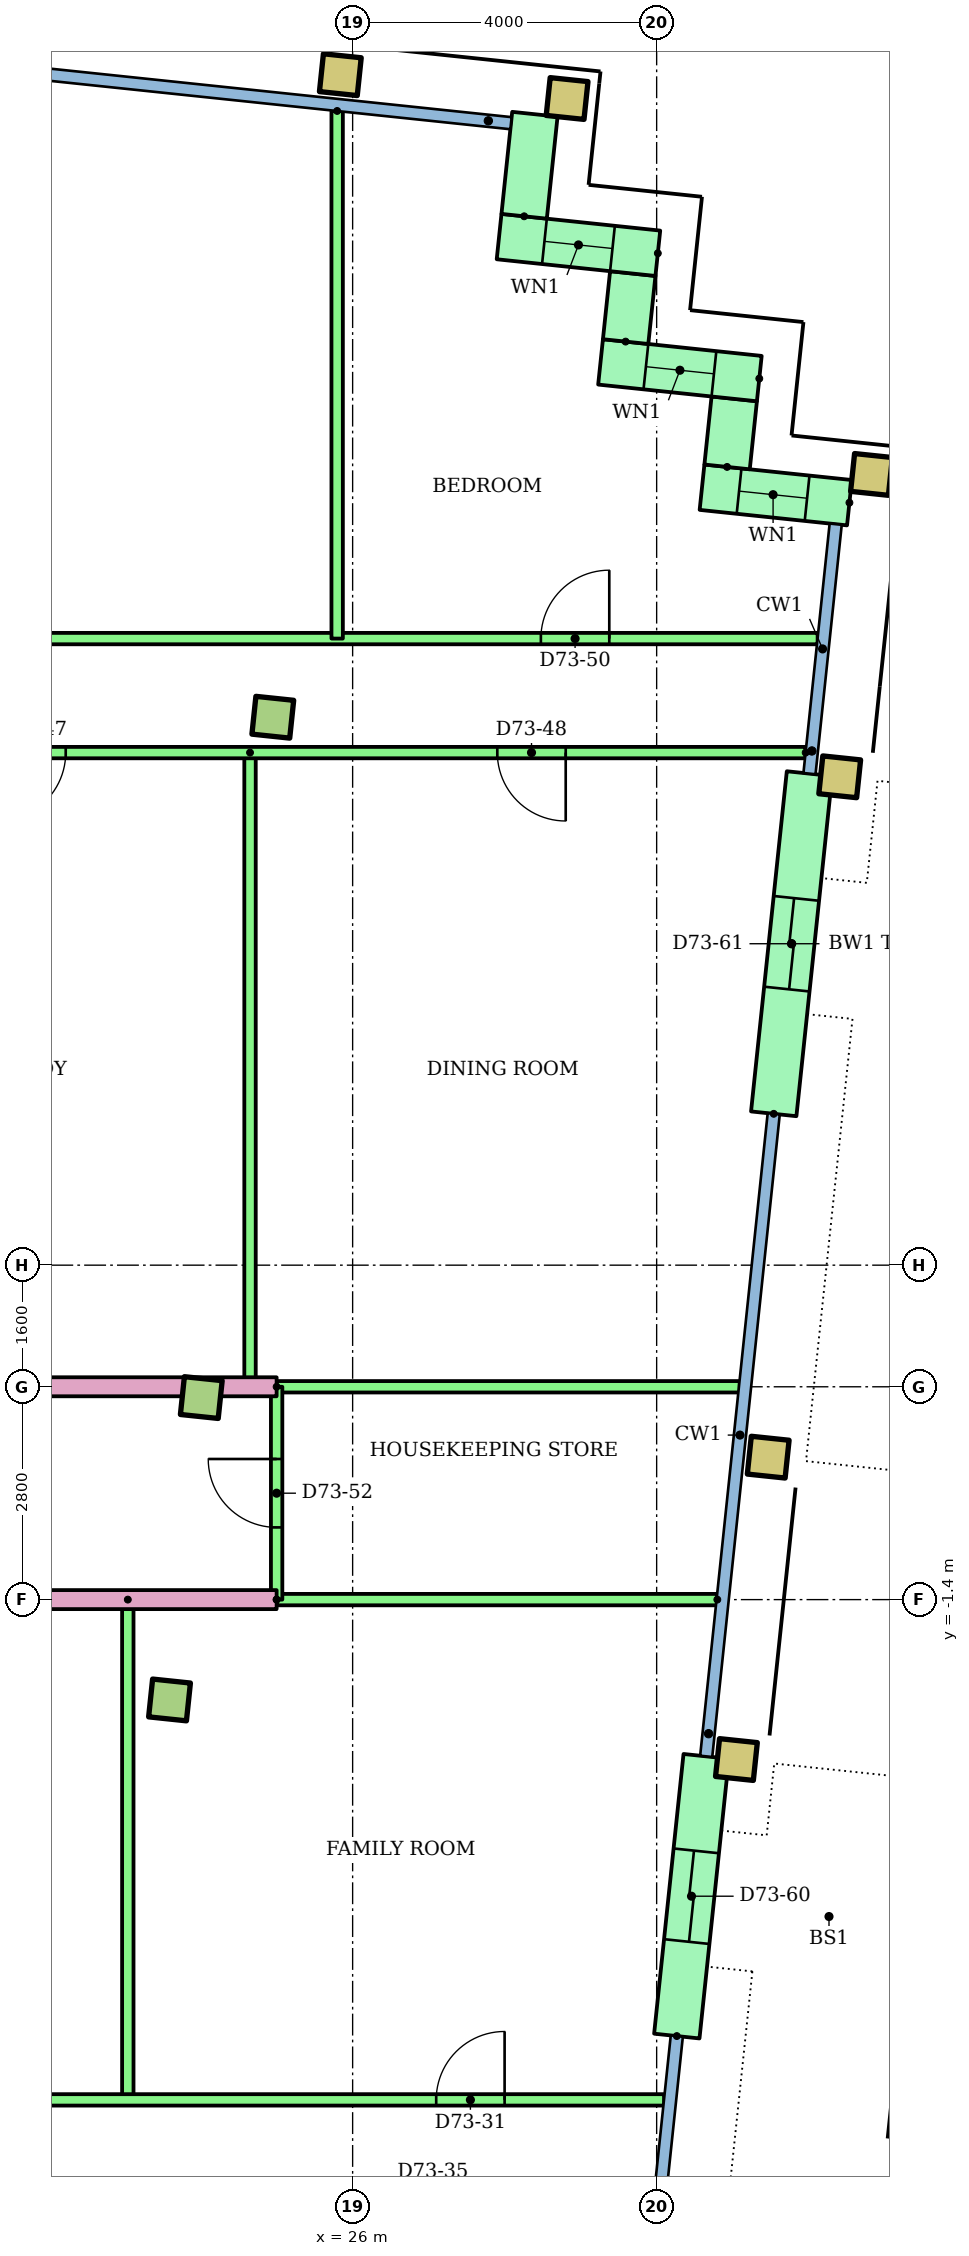
"""IFC4 building model, lengths in metres.
Left out: names, types, materials, properties, quantities, classifications, styles, units other than length and angle.
Written with IfcOpenShell. Run it as: python <this file> out.ifc"""

import sys

from ifc_helpers import new_model, si_unit, direction, frame, frame_2d, origin, origin_2d, place, context, subcontext, project, spatial, rectangle, hollow_rectangle, extrude, element, fill, save


model = new_model("IFC4")
c1 = context("Model", 3, precision=1e-05, world=origin(), true_north=direction((0.0, 1.0)))
c2 = subcontext(c1, "Body", "Model", "MODEL_VIEW")
j1 = project(units=[si_unit("LENGTHUNIT", "METRE"), si_unit("PLANEANGLEUNIT", "RADIAN")], contexts=[c1])
p1 = place(None, origin())
s1 = spatial("IfcSite", under=j1, at=p1, CompositionType="ELEMENT")
p2 = place(p1, origin())
s2 = spatial("IfcBuilding", under=s1, at=p2, CompositionType="ELEMENT")
p3 = place(p2, frame((0.0, 0.0, 278.7)))
s3 = spatial("IfcBuildingStorey", under=s2, at=p3, CompositionType="ELEMENT", Elevation=278.7)
p4 = place(p3, frame((23.591, -2.72, 0.0), z_axis=(0.0, 0.0, 1.0), x_axis=(0.994521895368, -0.104528463268, 0.0)))
e1 = element("IfcColumn", 1, at=p4, inside=s3, PredefinedType="COLUMN", context=c2, shape_type="SweptSolid", body=[
    extrude(rectangle(XDim=0.5, YDim=0.5, at=origin_2d()), origin(), (0.0, 0.0, 1.0), 3.2),
])
p5 = place(p3, frame((31.05, -3.504, 0.0), z_axis=(0.0, 0.0, 1.0), x_axis=(0.994521895368, -0.104528463268, 0.0)))
e2 = element("IfcColumn", 2, at=p5, inside=s3, PredefinedType="COLUMN", context=c2, shape_type="SweptSolid", body=[
    extrude(hollow_rectangle(XDim=0.5, YDim=0.5, WallThickness=0.025, at=origin_2d()), origin(), (0.0, 0.0, 1.0), 3.2),
])
p6 = place(p3, frame((24.009, 1.258, 0.0), z_axis=(0.0, 0.0, 1.0), x_axis=(0.994521895368, -0.104528463268, 0.0)))
e3 = element("IfcColumn", 3, at=p6, inside=s3, PredefinedType="COLUMN", context=c2, shape_type="SweptSolid", body=[
    extrude(rectangle(XDim=0.5, YDim=0.5, at=origin_2d()), origin(), (0.0, 0.0, 1.0), 3.2),
])
p7 = place(p3, frame((31.468, 0.474, 0.0), z_axis=(0.0, 0.0, 1.0), x_axis=(0.994521895368, -0.104528463268, 0.0)))
e4 = element("IfcColumn", 4, at=p7, inside=s3, PredefinedType="COLUMN", context=c2, shape_type="SweptSolid", body=[
    extrude(hollow_rectangle(XDim=0.5, YDim=0.5, WallThickness=0.025, at=origin_2d()), origin(), (0.0, 0.0, 1.0), 3.2),
])
p8 = place(p3, frame((24.95, 10.209, 0.0), z_axis=(0.0, 0.0, 1.0), x_axis=(0.994521895368, -0.104528463268, 0.0)))
e5 = element("IfcColumn", 5, at=p8, inside=s3, PredefinedType="COLUMN", context=c2, shape_type="SweptSolid", body=[
    extrude(rectangle(XDim=0.5, YDim=0.5, at=origin_2d()), origin(), (0.0, 0.0, 1.0), 3.2),
])
for number, where, z_axis, x_axis in (
    (6, (32.409, 9.425, 0.0), (0.0, 0.0, 1.0), (0.995, -0.105, 0.0)),
    (7, (32.827, 13.403, 0.0), (0.0, 0.0, 1.0), (0.995, -0.105, 0.0)),
    (8, (25.838, 18.662, 0.0), (0.0, 0.0, 1.0), (0.995, -0.105, 0.0)),
    (9, (28.822, 18.349, 0.0), (0.0, 0.0, 1.0), (0.995, -0.105, 0.0)),
):
    element("IfcColumn", number, at=place(p3, frame(where, z_axis=z_axis, x_axis=x_axis)), inside=s3, PredefinedType="COLUMN", context=c2, shape_type="SweptSolid", body=[
        extrude(hollow_rectangle(XDim=0.5, YDim=0.5, WallThickness=0.025, at=origin_2d()), origin(), (0.0, 0.0, 1.0), 3.2),
    ])
p9 = place(p3, frame((32.536, 13.031, 0.0), z_axis=(0.0, 0.0, 1.0), x_axis=(-0.994534226826, 0.104411070641, 0.0)))
e10 = element("IfcWall", 10, at=p9, inside=s3, PredefinedType="STANDARD", context=c2, shape_type="SweptSolid", body=[
    extrude(rectangle(XDim=1.95, YDim=0.6, at=frame_2d((0.975, 0.0))), origin(), (0.0, 0.0, 1.0), 2.8),
])
p10 = place(p9, frame((0.56, 0.0, 0.9)))
e11 = element("IfcOpeningElement", 11, at=p10, cuts=e10, PredefinedType="OPENING", context=c2, shape_type="SweptSolid", body=[
    extrude(rectangle(XDim=0.9, YDim=1.5, at=frame_2d((0.45, 0.75))), frame((0.0, 0.31, 0.0), z_axis=(0.0, -1.0, 0.0), x_axis=(1.0, 0.0, 0.0)), (0.0, 0.0, 1.0), 0.62),
])
p11 = place(p3, frame((30.927, 13.502, 0.0), z_axis=(0.0, 0.0, 1.0), x_axis=(0.104416541099, 0.994533652495, 0.0)))
e12 = element("IfcWall", 12, at=p11, inside=s3, PredefinedType="STANDARD", context=c2, shape_type="SweptSolid", body=[
    extrude(rectangle(XDim=0.9, YDim=0.6, at=frame_2d((0.45, 0.0))), origin(), (0.0, 0.0, 1.0), 2.8),
])
p12 = place(p3, frame((31.351, 14.664, 0.0), z_axis=(0.0, 0.0, 1.0), x_axis=(-0.994523910136, 0.104509292252, 0.0)))
e13 = element("IfcWall", 13, at=p12, inside=s3, PredefinedType="STANDARD", context=c2, shape_type="SweptSolid", body=[
    extrude(rectangle(XDim=2.1, YDim=0.6, at=frame_2d((1.05, 0.0))), origin(), (0.0, 0.0, 1.0), 2.8),
])
p13 = place(p12, frame((0.6, 0.0, 0.9)))
e14 = element("IfcOpeningElement", 14, at=p13, cuts=e13, PredefinedType="OPENING", context=c2, shape_type="SweptSolid", body=[
    extrude(rectangle(XDim=0.9, YDim=1.5, at=frame_2d((0.45, 0.75))), frame((0.0, 0.31, 0.0), z_axis=(0.0, -1.0, 0.0), x_axis=(1.0, 0.0, 0.0)), (0.0, 0.0, 1.0), 0.62),
])
p14 = place(p3, frame((29.592, 15.151, 0.0), z_axis=(0.0, 0.0, 1.0), x_axis=(0.104444712852, 0.994530694326, 0.0)))
e15 = element("IfcWall", 15, at=p14, inside=s3, PredefinedType="STANDARD", context=c2, shape_type="SweptSolid", body=[
    extrude(rectangle(XDim=0.9, YDim=0.6, at=frame_2d((0.45, 0.0))), origin(), (0.0, 0.0, 1.0), 2.8),
])
p15 = place(p3, frame((30.015, 16.312, 0.0), z_axis=(0.0, 0.0, 1.0), x_axis=(-0.994510548187, 0.104636368175, 0.0)))
e16 = element("IfcWall", 16, at=p15, inside=s3, PredefinedType="STANDARD", context=c2, shape_type="SweptSolid", body=[
    extrude(rectangle(XDim=2.1, YDim=0.6, at=frame_2d((1.05, 0.0))), origin(), (0.0, 0.0, 1.0), 2.8),
])
p16 = place(p15, frame((0.6, 0.0, 0.9)))
e17 = element("IfcOpeningElement", 17, at=p16, cuts=e16, PredefinedType="OPENING", context=c2, shape_type="SweptSolid", body=[
    extrude(rectangle(XDim=0.9, YDim=1.5, at=frame_2d((0.45, 0.75))), frame((0.0, 0.31, 0.0), z_axis=(0.0, -1.0, 0.0), x_axis=(1.0, 0.0, 0.0)), (0.0, 0.0, 1.0), 0.62),
])
p17 = place(p3, frame((28.257, 16.799, 0.0), z_axis=(0.0, 0.0, 1.0), x_axis=(0.104534153452, 0.994521297289, 0.0)))
e18 = element("IfcWall", 18, at=p17, inside=s3, PredefinedType="STANDARD", context=c2, shape_type="SweptSolid", body=[
    extrude(rectangle(XDim=1.35, YDim=0.6, at=frame_2d((0.675, 0.0))), origin(), (0.0, 0.0, 1.0), 2.8),
])
p18 = place(p3, frame((30.265, -7.142, 0.0), z_axis=(0.0, 0.0, 1.0), x_axis=(0.104513052986, 0.994523514933, 0.0)))
e19 = element("IfcWall", 19, at=p18, inside=s3, PredefinedType="STANDARD", context=c2, shape_type="SweptSolid", body=[
    extrude(rectangle(XDim=3.7, YDim=0.6, at=frame_2d((1.85, 0.0))), origin(), (0.0, 0.0, 1.0), 2.8),
])
p19 = place(p18, frame((1.25, 0.0, 0.0)))
e20 = element("IfcOpeningElement", 20, at=p19, cuts=e19, PredefinedType="OPENING", context=c2, shape_type="SweptSolid", body=[
    extrude(rectangle(XDim=1.2, YDim=2.1, at=frame_2d((0.6, 1.05))), frame((0.0, 0.31, 0.0), z_axis=(0.0, -1.0, 0.0), x_axis=(1.0, 0.0, 0.0)), (0.0, 0.0, 1.0), 0.62),
])
p20 = place(p3, frame((31.54, 4.991, 0.0), z_axis=(0.0, 0.0, 1.0), x_axis=(0.104546400045, 0.994520009974, 0.0)))
e21 = element("IfcWall", 21, at=p20, inside=s3, PredefinedType="STANDARD", context=c2, shape_type="SweptSolid", body=[
    extrude(rectangle(XDim=4.5, YDim=0.6, at=frame_2d((2.25, 0.0))), origin(), (0.0, 0.0, 1.0), 2.8),
])
p21 = place(p20, frame((1.65, 0.0, 0.0)))
e22 = element("IfcOpeningElement", 22, at=p21, cuts=e21, PredefinedType="OPENING", context=c2, shape_type="SweptSolid", body=[
    extrude(rectangle(XDim=1.2, YDim=2.1, at=frame_2d((0.6, 1.05))), frame((0.0, 0.31, 0.0), z_axis=(0.0, -1.0, 0.0), x_axis=(1.0, 0.0, 0.0)), (0.0, 0.0, 1.0), 0.62),
])
p22 = place(p3, frame((23.042, -1.4, 0.0), z_axis=(0.0, 0.0, 1.0), x_axis=(0.0, -1.0, 0.0)))
e23 = element("IfcWall", 23, at=p22, inside=s3, PredefinedType="PARTITIONING", context=c2, shape_type="SweptSolid", body=[
    extrude(rectangle(XDim=6.582, YDim=0.15, at=frame_2d((3.291, 0.0))), origin(), (0.0, 0.0, 1.0), 2.4),
])
p23 = place(p3, frame((8.142, -7.982, 0.0)))
e24 = element("IfcWall", 24, at=p23, inside=s3, PredefinedType="PARTITIONING", context=c2, shape_type="SweptSolid", body=[
    extrude(rectangle(XDim=21.955, YDim=0.15, at=frame_2d((10.978, 0.0))), origin(), (0.0, 0.0, 1.0), 2.4),
])
p24 = place(p23, frame((4.7, 0.0, 0.0)))
e25 = element("IfcOpeningElement", 25, at=p24, cuts=e24, PredefinedType="OPENING", context=c2, shape_type="SweptSolid", body=[
    extrude(rectangle(XDim=0.9, YDim=2.1, at=frame_2d((0.45, 1.05))), frame((0.0, 0.085, 0.0), z_axis=(0.0, -1.0, 0.0), x_axis=(1.0, 0.0, 0.0)), (0.0, 0.0, 1.0), 0.17),
])
p25 = place(p23, frame((10.95, 0.0, 0.0)))
e26 = element("IfcOpeningElement", 26, at=p25, cuts=e24, PredefinedType="OPENING", context=c2, shape_type="SweptSolid", body=[
    extrude(rectangle(XDim=0.9, YDim=2.1, at=frame_2d((0.45, 1.05))), frame((0.0, 0.085, 0.0), z_axis=(0.0, -1.0, 0.0), x_axis=(1.0, 0.0, 0.0)), (0.0, 0.0, 1.0), 0.17),
])
p26 = place(p23, frame((18.958, 0.0, 0.0)))
e27 = element("IfcOpeningElement", 27, at=p26, cuts=e24, PredefinedType="OPENING", context=c2, shape_type="SweptSolid", body=[
    extrude(rectangle(XDim=0.9, YDim=2.1, at=frame_2d((0.45, 1.05))), frame((0.0, 0.085, 0.0), z_axis=(0.0, -1.0, 0.0), x_axis=(1.0, 0.0, 0.0)), (0.0, 0.0, 1.0), 0.17),
])
p27 = place(p3, frame((25.0, -1.4, 0.0), z_axis=(0.0, 0.0, 1.0), x_axis=(-1.0, 0.0, 0.0)))
e28 = element("IfcWall", 28, at=p27, inside=s3, PredefinedType="PARTITIONING", context=c2, shape_type="SweptSolid", body=[
    extrude(rectangle(XDim=15.0, YDim=0.25, at=frame_2d((7.5, 0.0))), origin(), (0.0, 0.0, 1.0), 2.4),
])
p28 = place(p3, frame((30.798, -1.4, 0.0), z_axis=(0.0, 0.0, 1.0), x_axis=(-1.0, 0.0, 0.0)))
e29 = element("IfcWall", 29, at=p28, inside=s3, PredefinedType="PARTITIONING", context=c2, shape_type="SweptSolid", body=[
    extrude(rectangle(XDim=5.798, YDim=0.15, at=frame_2d((2.899, 0.0))), origin(), (0.0, 0.0, 1.0), 2.4),
])
p29 = place(p3, frame((24.65, 9.743, 0.0), z_axis=(0.0, 0.0, 1.0), x_axis=(0.0, -1.0, 0.0)))
e30 = element("IfcWall", 30, at=p29, inside=s3, PredefinedType="PARTITIONING", context=c2, shape_type="SweptSolid", body=[
    extrude(rectangle(XDim=8.344, YDim=0.15, at=frame_2d((4.172, 0.0))), origin(), (0.0, 0.0, 1.0), 2.4),
])
p30 = place(p3, frame((31.96, 9.743, 0.0), z_axis=(0.0, 0.0, 1.0), x_axis=(-1.0, 0.0, 0.0)))
e31 = element("IfcWall", 31, at=p30, inside=s3, PredefinedType="PARTITIONING", context=c2, shape_type="SweptSolid", body=[
    extrude(rectangle(XDim=19.96, YDim=0.15, at=frame_2d((9.98, 0.0))), origin(), (0.0, 0.0, 1.0), 2.4),
])
p31 = place(p30, frame((15.372, 0.0, 0.0)))
e32 = element("IfcOpeningElement", 32, at=p31, cuts=e31, PredefinedType="OPENING", context=c2, shape_type="SweptSolid", body=[
    extrude(rectangle(XDim=0.9, YDim=2.1, at=frame_2d((0.45, 1.05))), frame((0.0, 0.085, 0.0), z_axis=(0.0, -1.0, 0.0), x_axis=(1.0, 0.0, 0.0)), (0.0, 0.0, 1.0), 0.17),
])
p32 = place(p30, frame((9.735, 0.0, 0.0)))
e33 = element("IfcOpeningElement", 33, at=p32, cuts=e31, PredefinedType="OPENING", context=c2, shape_type="SweptSolid", body=[
    extrude(rectangle(XDim=0.9, YDim=2.1, at=frame_2d((0.45, 1.05))), frame((0.0, 0.085, 0.0), z_axis=(0.0, -1.0, 0.0), x_axis=(1.0, 0.0, 0.0)), (0.0, 0.0, 1.0), 0.17),
])
p33 = place(p30, frame((3.157, 0.0, 0.0)))
e34 = element("IfcOpeningElement", 34, at=p33, cuts=e31, PredefinedType="OPENING", context=c2, shape_type="SweptSolid", body=[
    extrude(rectangle(XDim=0.9, YDim=2.1, at=frame_2d((0.45, 1.05))), frame((0.0, 0.085, 0.0), z_axis=(0.0, -1.0, 0.0), x_axis=(1.0, 0.0, 0.0)), (0.0, 0.0, 1.0), 0.17),
])
p34 = place(p3, frame((10.0, 11.243, 0.0)))
e35 = element("IfcWall", 35, at=p34, inside=s3, PredefinedType="PARTITIONING", context=c2, shape_type="SweptSolid", body=[
    extrude(rectangle(XDim=22.118, YDim=0.15, at=frame_2d((11.059, 0.0))), origin(), (0.0, 0.0, 1.0), 2.4),
])
p35 = place(p34, frame((7.398, 0.0, 0.0)))
e36 = element("IfcOpeningElement", 36, at=p35, cuts=e35, PredefinedType="OPENING", context=c2, shape_type="SweptSolid", body=[
    extrude(rectangle(XDim=1.0, YDim=2.1, at=frame_2d((0.5, 1.05))), frame((0.0, 0.085, 0.0), z_axis=(0.0, -1.0, 0.0), x_axis=(1.0, 0.0, 0.0)), (0.0, 0.0, 1.0), 0.17),
])
p36 = place(p34, frame((18.477, 0.0, 0.0)))
e37 = element("IfcOpeningElement", 37, at=p36, cuts=e35, PredefinedType="OPENING", context=c2, shape_type="SweptSolid", body=[
    extrude(rectangle(XDim=0.9, YDim=2.1, at=frame_2d((0.45, 1.05))), frame((0.0, 0.085, 0.0), z_axis=(0.0, -1.0, 0.0), x_axis=(1.0, 0.0, 0.0)), (0.0, 0.0, 1.0), 0.17),
])
p37 = place(p3, frame((25.796, 18.185, 0.0), z_axis=(0.0, 0.0, 1.0), x_axis=(0.0, -1.0, 0.0)))
e38 = element("IfcWall", 38, at=p37, inside=s3, PredefinedType="PARTITIONING", context=c2, shape_type="SweptSolid", body=[
    extrude(rectangle(XDim=6.941, YDim=0.15, at=frame_2d((3.471, 0.0))), origin(), (0.0, 0.0, 1.0), 2.4),
])
p38 = place(p3, frame((10.0, 1.4, 0.0)))
e39 = element("IfcWall", 39, at=p38, inside=s3, PredefinedType="PARTITIONING", context=c2, shape_type="SweptSolid", body=[
    extrude(rectangle(XDim=15.0, YDim=0.25, at=frame_2d((7.5, 0.0))), origin(), (0.0, 0.0, 1.0), 2.4),
])
p39 = place(p38, frame((0.5, 0.0, 0.0)))
e40 = element("IfcOpeningElement", 40, at=p39, cuts=e39, PredefinedType="OPENING", context=c2, shape_type="SweptSolid", body=[
    extrude(rectangle(XDim=1.0, YDim=2.1, at=frame_2d((0.5, 1.05))), frame((0.0, 0.135, 0.0), z_axis=(0.0, -1.0, 0.0), x_axis=(1.0, 0.0, 0.0)), (0.0, 0.0, 1.0), 0.27),
])
p40 = place(p3, frame((25.0, 1.4, 0.0)))
e41 = element("IfcWall", 41, at=p40, inside=s3, PredefinedType="PARTITIONING", context=c2, shape_type="SweptSolid", body=[
    extrude(rectangle(XDim=6.093, YDim=0.15, at=frame_2d((3.046, 0.0))), origin(), (0.0, 0.0, 1.0), 2.4),
])
p41 = place(p3, frame((25.0, -1.4, 0.0), z_axis=(0.0, 0.0, 1.0), x_axis=(0.0, 1.0, 0.0)))
e42 = element("IfcWall", 42, at=p41, inside=s3, PredefinedType="PARTITIONING", context=c2, shape_type="SweptSolid", body=[
    extrude(rectangle(XDim=2.8, YDim=0.15, at=frame_2d((1.4, 0.0))), origin(), (0.0, 0.0, 1.0), 2.4),
])
p42 = place(p41, frame((0.95, 0.0, 0.0)))
e43 = element("IfcOpeningElement", 43, at=p42, cuts=e42, PredefinedType="OPENING", context=c2, shape_type="SweptSolid", body=[
    extrude(rectangle(XDim=0.9, YDim=2.1, at=frame_2d((0.45, 1.05))), frame((0.0, 0.085, 0.0), z_axis=(0.0, -1.0, 0.0), x_axis=(1.0, 0.0, 0.0)), (0.0, 0.0, 1.0), 0.17),
])
p43 = place(p10, origin())
e44 = element("IfcWindow", 44, at=p43, inside=s3, PartitioningType="SINGLE_PANEL", PredefinedType="WINDOW", context=c2, shape_type="SweptSolid", body=[
    extrude(rectangle(XDim=0.9, YDim=1.5, at=frame_2d((0.45, 0.75))), frame((0.0, 0.03, 0.0), z_axis=(0.0, -1.0, 0.0), x_axis=(1.0, 0.0, 0.0)), (0.0, 0.0, 1.0), 0.06),
])
fill(e11, e44)
p44 = place(p13, origin())
e45 = element("IfcWindow", 45, at=p44, inside=s3, PartitioningType="SINGLE_PANEL", PredefinedType="WINDOW", context=c2, shape_type="SweptSolid", body=[
    extrude(rectangle(XDim=0.9, YDim=1.5, at=frame_2d((0.45, 0.75))), frame((0.0, 0.03, 0.0), z_axis=(0.0, -1.0, 0.0), x_axis=(1.0, 0.0, 0.0)), (0.0, 0.0, 1.0), 0.06),
])
fill(e14, e45)
p45 = place(p16, origin())
e46 = element("IfcWindow", 46, at=p45, inside=s3, PartitioningType="SINGLE_PANEL", PredefinedType="WINDOW", context=c2, shape_type="SweptSolid", body=[
    extrude(rectangle(XDim=0.9, YDim=1.5, at=frame_2d((0.45, 0.75))), frame((0.0, 0.03, 0.0), z_axis=(0.0, -1.0, 0.0), x_axis=(1.0, 0.0, 0.0)), (0.0, 0.0, 1.0), 0.06),
])
fill(e17, e46)
p46 = place(p26, origin())
e47 = element("IfcDoor", 47, at=p46, inside=s3, OperationType="SINGLE_SWING_RIGHT", PredefinedType="DOOR", context=c2, shape_type="SweptSolid", body=[
    extrude(rectangle(XDim=0.9, YDim=2.1, at=frame_2d((0.45, 1.05))), frame((0.0, 0.025, 0.0), z_axis=(0.0, -1.0, 0.0), x_axis=(1.0, 0.0, 0.0)), (0.0, 0.0, 1.0), 0.05),
])
fill(e27, e47)
p47 = place(p32, origin())
e48 = element("IfcDoor", 48, at=p47, inside=s3, OperationType="SINGLE_SWING_RIGHT", PredefinedType="DOOR", context=c2, shape_type="SweptSolid", body=[
    extrude(rectangle(XDim=0.9, YDim=2.1, at=frame_2d((0.45, 1.05))), frame((0.0, 0.025, 0.0), z_axis=(0.0, -1.0, 0.0), x_axis=(1.0, 0.0, 0.0)), (0.0, 0.0, 1.0), 0.05),
])
fill(e33, e48)
p48 = place(p33, origin())
e49 = element("IfcDoor", 49, at=p48, inside=s3, OperationType="SINGLE_SWING_LEFT", PredefinedType="DOOR", context=c2, shape_type="SweptSolid", body=[
    extrude(rectangle(XDim=0.9, YDim=2.1, at=frame_2d((0.45, 1.05))), frame((0.0, 0.025, 0.0), z_axis=(0.0, -1.0, 0.0), x_axis=(1.0, 0.0, 0.0)), (0.0, 0.0, 1.0), 0.05),
])
fill(e34, e49)
p49 = place(p36, origin())
e50 = element("IfcDoor", 50, at=p49, inside=s3, OperationType="SINGLE_SWING_RIGHT", PredefinedType="DOOR", context=c2, shape_type="SweptSolid", body=[
    extrude(rectangle(XDim=0.9, YDim=2.1, at=frame_2d((0.45, 1.05))), frame((0.0, 0.025, 0.0), z_axis=(0.0, -1.0, 0.0), x_axis=(1.0, 0.0, 0.0)), (0.0, 0.0, 1.0), 0.05),
])
fill(e37, e50)
p50 = place(p42, origin())
e51 = element("IfcDoor", 51, at=p50, inside=s3, OperationType="SINGLE_SWING_RIGHT", PredefinedType="DOOR", context=c2, shape_type="SweptSolid", body=[
    extrude(rectangle(XDim=0.9, YDim=2.1, at=frame_2d((0.45, 1.05))), frame((0.0, 0.025, 0.0), z_axis=(0.0, -1.0, 0.0), x_axis=(1.0, 0.0, 0.0)), (0.0, 0.0, 1.0), 0.05),
])
fill(e43, e51)
p51 = place(p19, origin())
e52 = element("IfcDoor", 52, at=p51, inside=s3, OperationType="SLIDING_TO_LEFT", PredefinedType="DOOR", context=c2, shape_type="SweptSolid", body=[
    extrude(rectangle(XDim=1.2, YDim=2.1, at=frame_2d((0.6, 1.05))), frame((0.0, 0.025, 0.0), z_axis=(0.0, -1.0, 0.0), x_axis=(1.0, 0.0, 0.0)), (0.0, 0.0, 1.0), 0.05),
])
fill(e20, e52)
p52 = place(p21, origin())
e53 = element("IfcDoor", 53, at=p52, inside=s3, OperationType="SLIDING_TO_LEFT", PredefinedType="DOOR", context=c2, shape_type="SweptSolid", body=[
    extrude(rectangle(XDim=1.2, YDim=2.1, at=frame_2d((0.6, 1.05))), frame((0.0, 0.025, 0.0), z_axis=(0.0, -1.0, 0.0), x_axis=(1.0, 0.0, 0.0)), (0.0, 0.0, 1.0), 0.05),
])
fill(e22, e53)
save(model, sys.argv[1])
